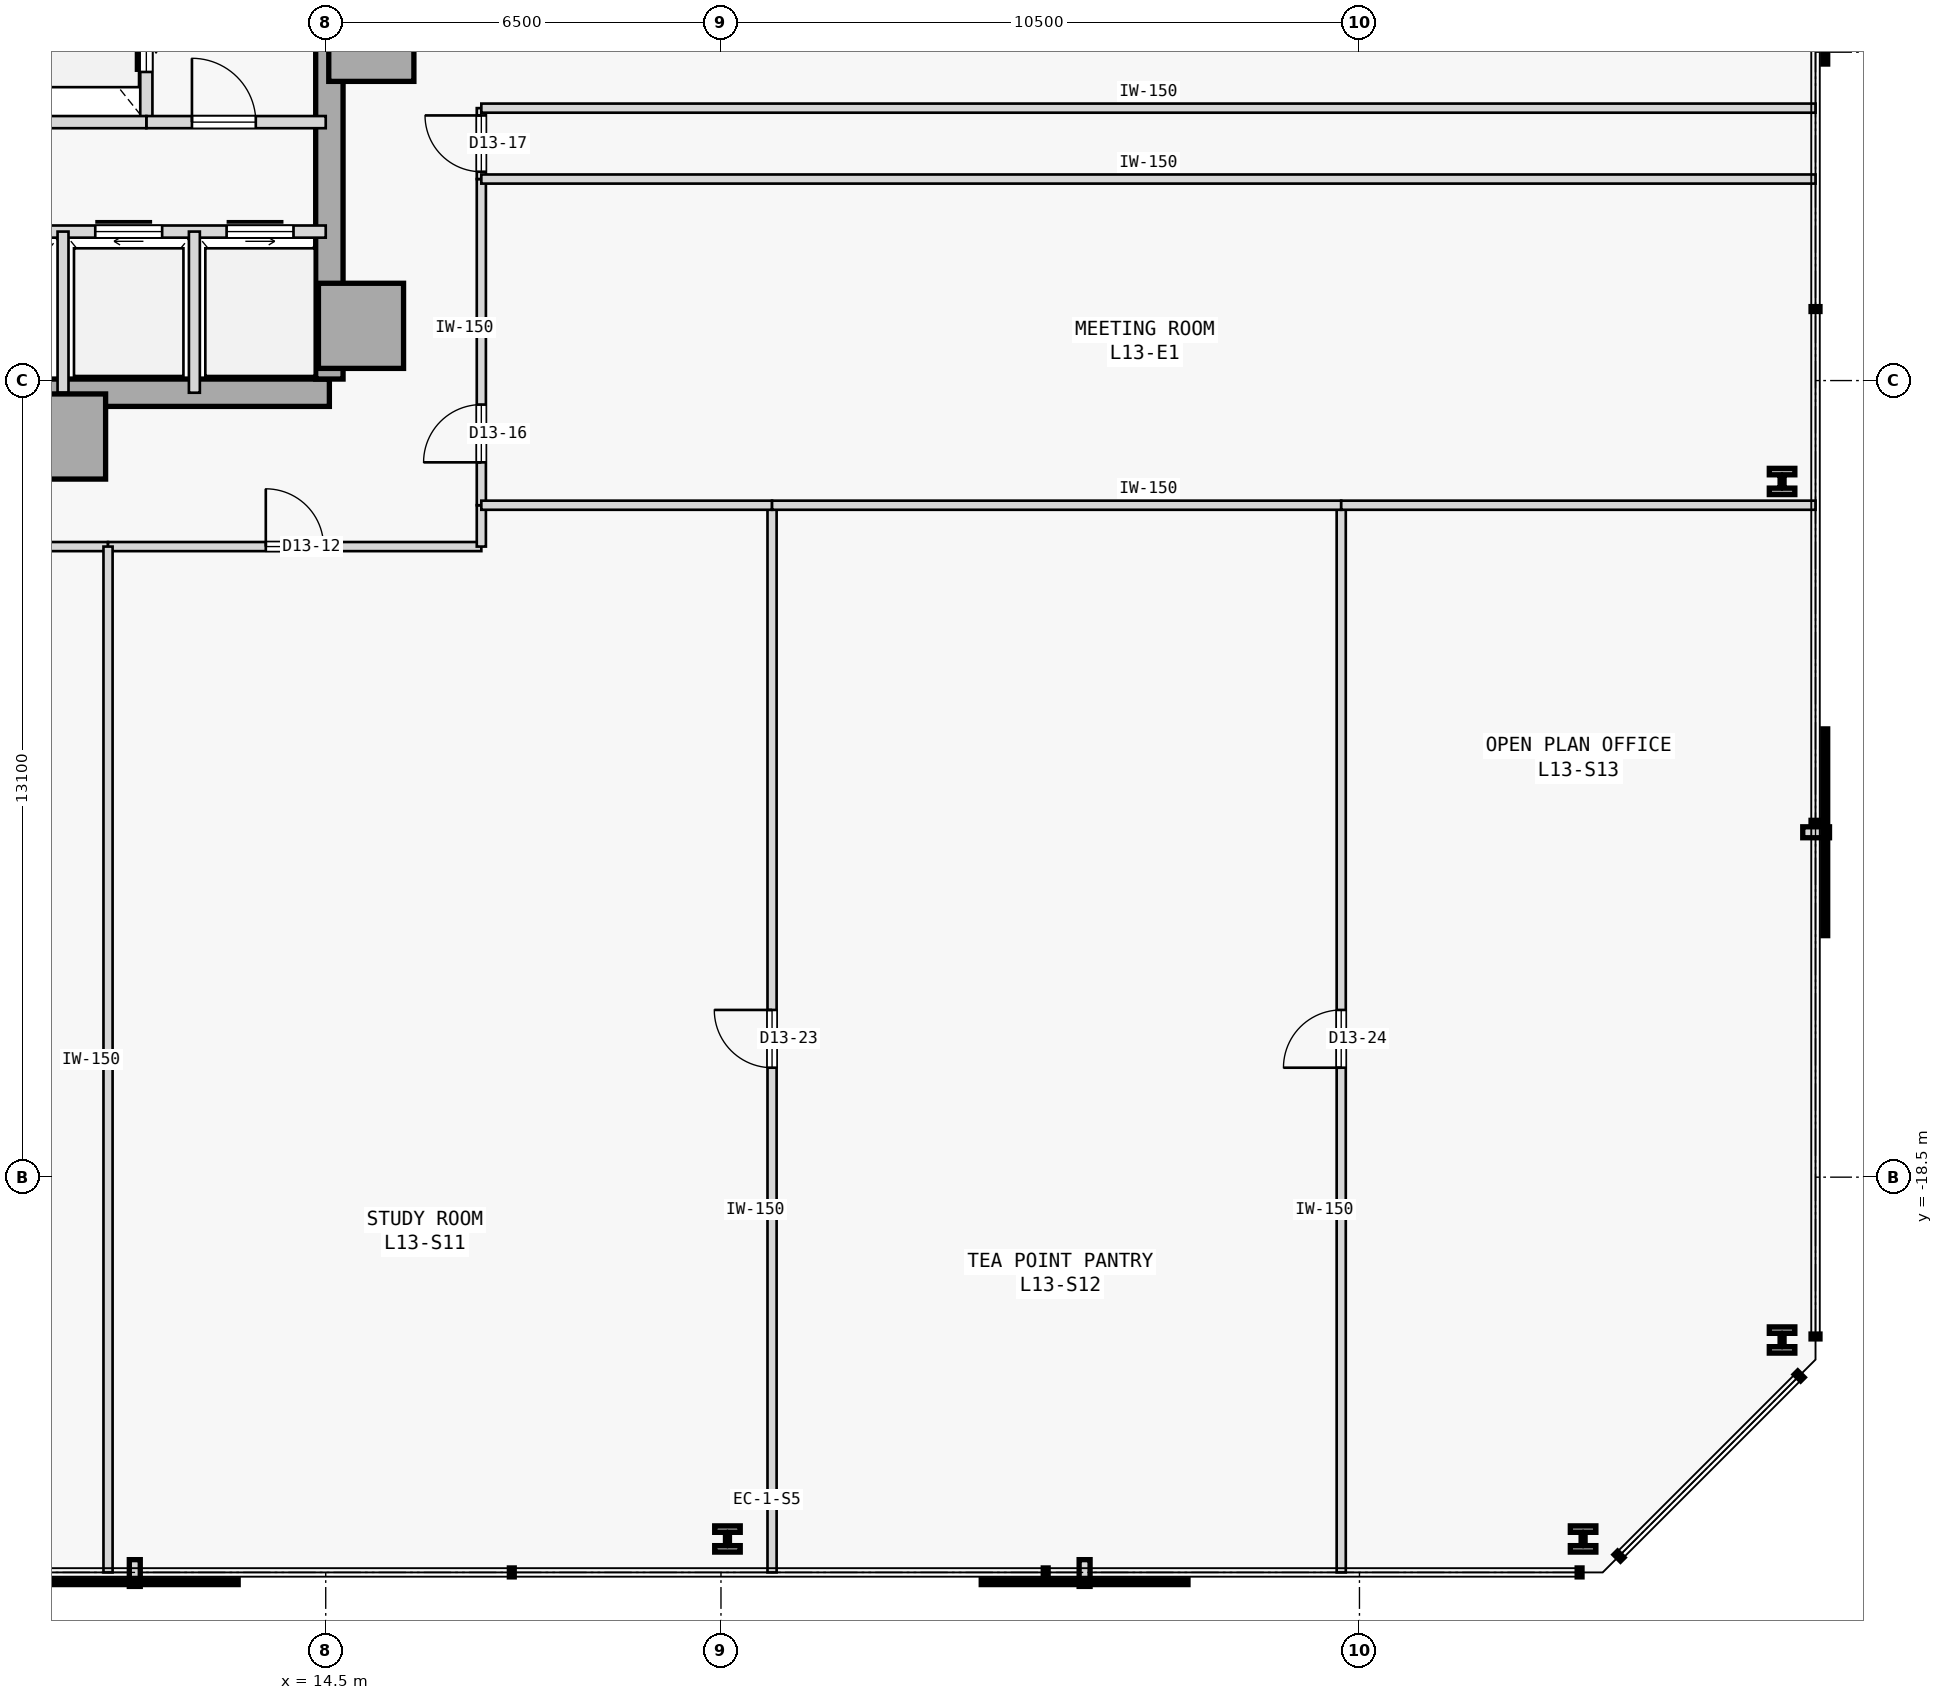
"""IFC4 building model, lengths in metres.
Left out: names, types, materials, properties, quantities, classifications, styles, units other than length and angle.
Written with IfcOpenShell. Run it as: python <this file> out.ifc"""

import sys

from ifc_helpers import new_model, si_unit, direction, frame, frame_2d, origin, origin_2d, place, context, subcontext, project, spatial, rectangle, i_section, extrude, element, fill, save


model = new_model("IFC4")
c1 = context("Model", 3, precision=1e-05, world=origin(), true_north=direction((0.0, 1.0)))
c2 = subcontext(c1, "Body", "Model", "MODEL_VIEW")
j1 = project(units=[si_unit("LENGTHUNIT", "METRE"), si_unit("PLANEANGLEUNIT", "RADIAN")], contexts=[c1])
p1 = place(None, origin())
s1 = spatial("IfcSite", under=j1, at=p1, CompositionType="ELEMENT")
p2 = place(p1, origin())
s2 = spatial("IfcBuilding", under=s1, at=p2, CompositionType="ELEMENT")
p3 = place(p2, frame((0.0, 0.0, 56.0)))
s3 = spatial("IfcBuildingStorey", under=s2, at=p3, CompositionType="ELEMENT", Elevation=56.0)
for number, where, z_axis, x_axis in (
    (1, (15.25, 0.22, 0.0), (0.0, 0.0, 1.0), (1.0, 0.0, 0.0)),
    (2, (15.08, -4.5, 0.0), (0.0, 0.0, 1.0), (1.0, 0.0, 0.0)),
    (3, (10.18, -6.32, 0.0), (0.0, 0.0, 1.0), (1.0, 0.0, 0.0)),
):
    element("IfcColumn", number, at=place(p3, frame(where, z_axis=z_axis, x_axis=x_axis)), inside=s3, PredefinedType="COLUMN", context=c2, shape_type="SweptSolid", body=[
        extrude(rectangle(XDim=1.4, YDim=1.4, at=origin_2d()), origin(), (0.0, 0.0, 1.0), 3.8),
    ])
p4 = place(p3, frame((3.7, -5.6, 0.0), z_axis=(0.0, 0.0, 1.0), x_axis=(1.0, 0.0, 0.0)))
e4 = element("IfcWall", 4, at=p4, inside=s3, PredefinedType="SHEAR", context=c2, shape_type="SweptSolid", body=[
    extrude(rectangle(XDim=10.86, YDim=0.45, at=frame_2d((5.43, 0.0))), origin(), (0.0, 0.0, 1.0), 3.575),
])
p5 = place(p3, frame((14.56, -5.375, 0.0), z_axis=(0.0, 0.0, 1.0), x_axis=(0.0, 1.0, 0.0)))
e5 = element("IfcWall", 5, at=p5, inside=s3, PredefinedType="SHEAR", context=c2, shape_type="SweptSolid", body=[
    extrude(rectangle(XDim=10.75, YDim=0.45, at=frame_2d((5.375, 0.0))), origin(), (0.0, 0.0, 1.0), 3.575),
])
for number, where, z_axis, x_axis in (
    (6, (21.107, -24.45, 0.0), (0.0, 0.0, 1.0), (1.0, 0.0, 0.0)),
    (7, (35.178, -24.45, 0.0), (0.0, 0.0, 1.0), (1.0, 0.0, 0.0)),
    (8, (38.45, -21.178, 0.0), (0.0, 0.0, 1.0), (1.0, 0.0, 0.0)),
    (9, (38.45, -7.059, 0.0), (0.0, 0.0, 1.0), (1.0, 0.0, 0.0)),
):
    element("IfcColumn", number, at=place(p3, frame(where, z_axis=z_axis, x_axis=x_axis)), inside=s3, PredefinedType="COLUMN", context=c2, shape_type="SweptSolid", body=[
        extrude(i_section(OverallWidth=0.42, OverallDepth=0.431, WebThickness=0.065, FlangeThickness=0.106, FilletRadius=0.015, at=origin_2d()), origin(), (0.0, 0.0, 1.0), 3.8),
    ])
p6 = place(p3, frame((11.55, -1.15, 0.0), z_axis=(0.0, 0.0, 1.0), x_axis=(0.0, 1.0, 0.0)))
e10 = element("IfcWall", 10, at=p6, inside=s3, PredefinedType="STANDARD", context=c2, shape_type="SweptSolid", body=[
    extrude(rectangle(XDim=2.75, YDim=0.2, at=frame_2d((1.375, 0.0))), origin(), (0.0, 0.0, 1.0), 3.575),
])
p7 = place(p6, frame((0.825, 0.0, 0.0)))
e11 = element("IfcOpeningElement", 11, at=p7, cuts=e10, PredefinedType="OPENING", context=c2, shape_type="SweptSolid", body=[
    extrude(rectangle(XDim=1.1, YDim=2.15, at=frame_2d((0.55, 1.075))), frame((0.0, 0.11, 0.0), z_axis=(0.0, -1.0, 0.0), x_axis=(1.0, 0.0, 0.0)), (0.0, 0.0, 1.0), 0.22),
])
p8 = place(p3, frame((11.55, -1.15, 0.0), z_axis=(0.0, 0.0, 1.0), x_axis=(1.0, 0.0, 0.0)))
e12 = element("IfcWall", 12, at=p8, inside=s3, PredefinedType="STANDARD", context=c2, shape_type="SweptSolid", body=[
    extrude(rectangle(XDim=2.95, YDim=0.2, at=frame_2d((1.475, 0.0))), origin(), (0.0, 0.0, 1.0), 3.575),
])
p9 = place(p8, frame((0.75, 0.0, 0.0)))
e13 = element("IfcOpeningElement", 13, at=p9, cuts=e12, PredefinedType="OPENING", context=c2, shape_type="SweptSolid", body=[
    extrude(rectangle(XDim=1.05, YDim=2.18, at=frame_2d((0.525, 1.09))), frame((0.0, 0.11, 0.0), z_axis=(0.0, -1.0, 0.0), x_axis=(1.0, 0.0, 0.0)), (0.0, 0.0, 1.0), 0.22),
])
p10 = place(p3, frame((9.35, -1.15, 0.0), z_axis=(0.0, 0.0, 1.0), x_axis=(1.0, 0.0, 0.0)))
e14 = element("IfcWall", 14, at=p10, inside=s3, PredefinedType="STANDARD", context=c2, shape_type="SweptSolid", body=[
    extrude(rectangle(XDim=2.2, YDim=0.2, at=frame_2d((1.1, 0.0))), origin(), (0.0, 0.0, 1.0), 3.575),
])
p11 = place(p3, frame((3.7, -2.95, 0.0), z_axis=(0.0, 0.0, 1.0), x_axis=(1.0, 0.0, 0.0)))
e15 = element("IfcWall", 15, at=p11, inside=s3, PredefinedType="STANDARD", context=c2, shape_type="SweptSolid", body=[
    extrude(rectangle(XDim=10.8, YDim=0.2, at=frame_2d((5.4, 0.0))), origin(), (0.0, 0.0, 1.0), 3.575),
])
p12 = place(p11, frame((7.01, 0.0, 0.0)))
e16 = element("IfcOpeningElement", 16, at=p12, cuts=e15, PredefinedType="OPENING", context=c2, shape_type="SweptSolid", body=[
    extrude(rectangle(XDim=1.1, YDim=2.15, at=frame_2d((0.55, 1.075))), frame((0.0, 0.11, 0.0), z_axis=(0.0, -1.0, 0.0), x_axis=(1.0, 0.0, 0.0)), (0.0, 0.0, 1.0), 0.22),
])
p13 = place(p11, frame((9.17, 0.0, 0.0)))
e17 = element("IfcOpeningElement", 17, at=p13, cuts=e15, PredefinedType="OPENING", context=c2, shape_type="SweptSolid", body=[
    extrude(rectangle(XDim=1.1, YDim=2.15, at=frame_2d((0.55, 1.075))), frame((0.0, 0.11, 0.0), z_axis=(0.0, -1.0, 0.0), x_axis=(1.0, 0.0, 0.0)), (0.0, 0.0, 1.0), 0.22),
])
for number, where, z_axis, x_axis in (
    (18, (12.34, -5.6, 0.0), (0.0, 0.0, 1.0), (0.0, 1.0, 0.0)),
    (19, (10.18, -5.6, 0.0), (0.0, 0.0, 1.0), (0.0, 1.0, 0.0)),
):
    element("IfcWall", number, at=place(p3, frame(where, z_axis=z_axis, x_axis=x_axis)), inside=s3, PredefinedType="STANDARD", context=c2, shape_type="SweptSolid", body=[
        extrude(rectangle(XDim=2.65, YDim=0.18, at=frame_2d((1.325, 0.0))), origin(), (0.0, 0.0, 1.0), 3.575),
    ])
p14 = place(p3, frame((0.92, -8.13, 0.0), z_axis=(0.0, 0.0, 1.0), x_axis=(1.0, 0.0, 0.0)))
e20 = element("IfcWall", 20, at=p14, inside=s3, PredefinedType="PARTITIONING", context=c2, shape_type="SweptSolid", body=[
    extrude(rectangle(XDim=10.0, YDim=0.15, at=frame_2d((5.0, 0.0))), origin(), (0.0, 0.0, 1.0), 3.575),
])
p15 = place(p3, frame((10.92, -8.13, 0.0), z_axis=(0.0, 0.0, 1.0), x_axis=(1.0, 0.0, 0.0)))
e21 = element("IfcWall", 21, at=p15, inside=s3, PredefinedType="PARTITIONING", context=c2, shape_type="SweptSolid", body=[
    extrude(rectangle(XDim=6.139, YDim=0.15, at=frame_2d((3.07, 0.0))), origin(), (0.0, 0.0, 1.0), 3.575),
])
p16 = place(p15, frame((2.594, 0.0, 0.0)))
e22 = element("IfcOpeningElement", 22, at=p16, cuts=e21, PredefinedType="OPENING", context=c2, shape_type="SweptSolid", body=[
    extrude(rectangle(XDim=0.95, YDim=2.15, at=frame_2d((0.475, 1.075))), frame((0.0, 0.085, 0.0), z_axis=(0.0, -1.0, 0.0), x_axis=(1.0, 0.0, 0.0)), (0.0, 0.0, 1.0), 0.17),
])
p17 = place(p3, frame((17.059, -8.13, 0.0), z_axis=(0.0, 0.0, 1.0), x_axis=(0.0, 1.0, 0.0)))
e23 = element("IfcWall", 23, at=p17, inside=s3, PredefinedType="PARTITIONING", context=c2, shape_type="SweptSolid", body=[
    extrude(rectangle(XDim=0.68, YDim=0.15, at=frame_2d((0.34, 0.0))), origin(), (0.0, 0.0, 1.0), 3.575),
])
p18 = place(p3, frame((17.059, -7.45, 0.0), z_axis=(0.0, 0.0, 1.0), x_axis=(0.0, 1.0, 0.0)))
e24 = element("IfcWall", 24, at=p18, inside=s3, PredefinedType="PARTITIONING", context=c2, shape_type="SweptSolid", body=[
    extrude(rectangle(XDim=5.364, YDim=0.15, at=frame_2d((2.682, 0.0))), origin(), (0.0, 0.0, 1.0), 3.575),
])
p19 = place(p18, frame((0.705, 0.0, 0.0)))
e25 = element("IfcOpeningElement", 25, at=p19, cuts=e24, PredefinedType="OPENING", context=c2, shape_type="SweptSolid", body=[
    extrude(rectangle(XDim=0.95, YDim=2.15, at=frame_2d((0.475, 1.075))), frame((0.0, 0.085, 0.0), z_axis=(0.0, -1.0, 0.0), x_axis=(1.0, 0.0, 0.0)), (0.0, 0.0, 1.0), 0.17),
])
p20 = place(p3, frame((17.059, -2.086, 0.0), z_axis=(0.0, 0.0, 1.0), x_axis=(0.0, 1.0, 0.0)))
e26 = element("IfcWall", 26, at=p20, inside=s3, PredefinedType="PARTITIONING", context=c2, shape_type="SweptSolid", body=[
    extrude(rectangle(XDim=1.166, YDim=0.15, at=frame_2d((0.583, 0.0))), origin(), (0.0, 0.0, 1.0), 3.575),
])
p21 = place(p20, frame((0.12, 0.0, 0.0)))
e27 = element("IfcOpeningElement", 27, at=p21, cuts=e26, PredefinedType="OPENING", context=c2, shape_type="SweptSolid", body=[
    extrude(rectangle(XDim=0.926, YDim=2.15, at=frame_2d((0.463, 1.075))), frame((0.0, 0.085, 0.0), z_axis=(0.0, -1.0, 0.0), x_axis=(1.0, 0.0, 0.0)), (0.0, 0.0, 1.0), 0.17),
])
p22 = place(p3, frame((17.059, -0.92, 0.0), z_axis=(0.0, 0.0, 1.0), x_axis=(1.0, 0.0, 0.0)))
e28 = element("IfcWall", 28, at=p22, inside=s3, PredefinedType="PARTITIONING", context=c2, shape_type="SweptSolid", body=[
    extrude(rectangle(XDim=21.941, YDim=0.15, at=frame_2d((10.97, 0.0))), origin(), (0.0, 0.0, 1.0), 3.575),
])
p23 = place(p3, frame((10.92, -25.0, 0.0), z_axis=(0.0, 0.0, 1.0), x_axis=(0.0, 1.0, 0.0)))
e29 = element("IfcWall", 29, at=p23, inside=s3, PredefinedType="PARTITIONING", context=c2, shape_type="SweptSolid", body=[
    extrude(rectangle(XDim=16.87, YDim=0.15, at=frame_2d((8.435, 0.0))), origin(), (0.0, 0.0, 1.0), 3.575),
])
p24 = place(p3, frame((21.84, -25.0, 0.0), z_axis=(0.0, 0.0, 1.0), x_axis=(0.0, 1.0, 0.0)))
e30 = element("IfcWall", 30, at=p24, inside=s3, PredefinedType="PARTITIONING", context=c2, shape_type="SweptSolid", body=[
    extrude(rectangle(XDim=17.55, YDim=0.15, at=frame_2d((8.775, 0.0))), origin(), (0.0, 0.0, 1.0), 3.575),
])
p25 = place(p24, frame((8.3, 0.0, 0.0)))
e31 = element("IfcOpeningElement", 31, at=p25, cuts=e30, PredefinedType="OPENING", context=c2, shape_type="SweptSolid", body=[
    extrude(rectangle(XDim=0.95, YDim=2.15, at=frame_2d((0.475, 1.075))), frame((0.0, 0.085, 0.0), z_axis=(0.0, -1.0, 0.0), x_axis=(1.0, 0.0, 0.0)), (0.0, 0.0, 1.0), 0.17),
])
p26 = place(p3, frame((17.059, -7.45, 0.0), z_axis=(0.0, 0.0, 1.0), x_axis=(1.0, 0.0, 0.0)))
e32 = element("IfcWall", 32, at=p26, inside=s3, PredefinedType="PARTITIONING", context=c2, shape_type="SweptSolid", body=[
    extrude(rectangle(XDim=4.781, YDim=0.15, at=frame_2d((2.391, 0.0))), origin(), (0.0, 0.0, 1.0), 3.575),
])
p27 = place(p3, frame((31.2, -25.0, 0.0), z_axis=(0.0, 0.0, 1.0), x_axis=(0.0, 1.0, 0.0)))
e33 = element("IfcWall", 33, at=p27, inside=s3, PredefinedType="PARTITIONING", context=c2, shape_type="SweptSolid", body=[
    extrude(rectangle(XDim=17.55, YDim=0.15, at=frame_2d((8.775, 0.0))), origin(), (0.0, 0.0, 1.0), 3.575),
])
p28 = place(p27, frame((8.3, 0.0, 0.0)))
e34 = element("IfcOpeningElement", 34, at=p28, cuts=e33, PredefinedType="OPENING", context=c2, shape_type="SweptSolid", body=[
    extrude(rectangle(XDim=0.95, YDim=2.15, at=frame_2d((0.475, 1.075))), frame((0.0, 0.085, 0.0), z_axis=(0.0, -1.0, 0.0), x_axis=(1.0, 0.0, 0.0)), (0.0, 0.0, 1.0), 0.17),
])
p29 = place(p3, frame((21.84, -7.45, 0.0), z_axis=(0.0, 0.0, 1.0), x_axis=(1.0, 0.0, 0.0)))
e35 = element("IfcWall", 35, at=p29, inside=s3, PredefinedType="PARTITIONING", context=c2, shape_type="SweptSolid", body=[
    extrude(rectangle(XDim=9.36, YDim=0.15, at=frame_2d((4.68, 0.0))), origin(), (0.0, 0.0, 1.0), 3.575),
])
p30 = place(p3, frame((31.2, -7.45, 0.0), z_axis=(0.0, 0.0, 1.0), x_axis=(1.0, 0.0, 0.0)))
e36 = element("IfcWall", 36, at=p30, inside=s3, PredefinedType="PARTITIONING", context=c2, shape_type="SweptSolid", body=[
    extrude(rectangle(XDim=7.8, YDim=0.15, at=frame_2d((3.9, 0.0))), origin(), (0.0, 0.0, 1.0), 3.575),
])
p31 = place(p3, frame((17.059, -2.086, 0.0), z_axis=(0.0, 0.0, 1.0), x_axis=(1.0, 0.0, 0.0)))
e37 = element("IfcWall", 37, at=p31, inside=s3, PredefinedType="PARTITIONING", context=c2, shape_type="SweptSolid", body=[
    extrude(rectangle(XDim=21.941, YDim=0.15, at=frame_2d((10.97, 0.0))), origin(), (0.0, 0.0, 1.0), 3.575),
])
p32 = place(p9, origin())
e38 = element("IfcDoor", 38, at=p32, inside=s3, OperationType="SINGLE_SWING_LEFT", PredefinedType="DOOR", context=c2, shape_type="SweptSolid", body=[
    extrude(rectangle(XDim=1.05, YDim=2.18, at=frame_2d((0.525, 1.09))), frame((0.0, 0.025, 0.0), z_axis=(0.0, -1.0, 0.0), x_axis=(1.0, 0.0, 0.0)), (0.0, 0.0, 1.0), 0.05),
])
fill(e13, e38)
p33 = place(p7, origin())
e39 = element("IfcDoor", 39, at=p33, inside=s3, OperationType="SLIDING_TO_RIGHT", PredefinedType="DOOR", context=c2, shape_type="SweptSolid", body=[
    extrude(rectangle(XDim=1.1, YDim=2.15, at=frame_2d((0.55, 1.075))), frame((0.0, 0.025, 0.0), z_axis=(0.0, -1.0, 0.0), x_axis=(1.0, 0.0, 0.0)), (0.0, 0.0, 1.0), 0.05),
])
fill(e11, e39)
p34 = place(p12, origin())
e40 = element("IfcDoor", 40, at=p34, inside=s3, OperationType="SLIDING_TO_RIGHT", PredefinedType="DOOR", context=c2, shape_type="SweptSolid", body=[
    extrude(rectangle(XDim=1.1, YDim=2.15, at=frame_2d((0.55, 1.075))), frame((0.0, 0.025, 0.0), z_axis=(0.0, -1.0, 0.0), x_axis=(1.0, 0.0, 0.0)), (0.0, 0.0, 1.0), 0.05),
])
fill(e16, e40)
p35 = place(p13, origin())
e41 = element("IfcDoor", 41, at=p35, inside=s3, OperationType="SLIDING_TO_LEFT", PredefinedType="DOOR", context=c2, shape_type="SweptSolid", body=[
    extrude(rectangle(XDim=1.1, YDim=2.15, at=frame_2d((0.55, 1.075))), frame((0.0, 0.025, 0.0), z_axis=(0.0, -1.0, 0.0), x_axis=(1.0, 0.0, 0.0)), (0.0, 0.0, 1.0), 0.05),
])
fill(e17, e41)
p36 = place(p16, origin())
e42 = element("IfcDoor", 42, at=p36, inside=s3, OperationType="SINGLE_SWING_LEFT", PredefinedType="DOOR", context=c2, shape_type="SweptSolid", body=[
    extrude(rectangle(XDim=0.95, YDim=2.15, at=frame_2d((0.475, 1.075))), frame((0.0, 0.025, 0.0), z_axis=(0.0, -1.0, 0.0), x_axis=(1.0, 0.0, 0.0)), (0.0, 0.0, 1.0), 0.05),
])
fill(e22, e42)
p37 = place(p19, origin())
e43 = element("IfcDoor", 43, at=p37, inside=s3, OperationType="SINGLE_SWING_LEFT", PredefinedType="DOOR", context=c2, shape_type="SweptSolid", body=[
    extrude(rectangle(XDim=0.95, YDim=2.15, at=frame_2d((0.475, 1.075))), frame((0.0, 0.025, 0.0), z_axis=(0.0, -1.0, 0.0), x_axis=(1.0, 0.0, 0.0)), (0.0, 0.0, 1.0), 0.05),
])
fill(e25, e43)
p38 = place(p21, origin())
e44 = element("IfcDoor", 44, at=p38, inside=s3, OperationType="SINGLE_SWING_RIGHT", PredefinedType="DOOR", context=c2, shape_type="SweptSolid", body=[
    extrude(rectangle(XDim=0.926, YDim=2.15, at=frame_2d((0.463, 1.075))), frame((0.0, 0.025, 0.0), z_axis=(0.0, -1.0, 0.0), x_axis=(1.0, 0.0, 0.0)), (0.0, 0.0, 1.0), 0.05),
])
fill(e27, e44)
p39 = place(p25, origin())
e45 = element("IfcDoor", 45, at=p39, inside=s3, OperationType="SINGLE_SWING_RIGHT", PredefinedType="DOOR", context=c2, shape_type="SweptSolid", body=[
    extrude(rectangle(XDim=0.95, YDim=2.15, at=frame_2d((0.475, 1.075))), frame((0.0, 0.025, 0.0), z_axis=(0.0, -1.0, 0.0), x_axis=(1.0, 0.0, 0.0)), (0.0, 0.0, 1.0), 0.05),
])
fill(e31, e45)
p40 = place(p28, origin())
e46 = element("IfcDoor", 46, at=p40, inside=s3, OperationType="SINGLE_SWING_LEFT", PredefinedType="DOOR", context=c2, shape_type="SweptSolid", body=[
    extrude(rectangle(XDim=0.95, YDim=2.15, at=frame_2d((0.475, 1.075))), frame((0.0, 0.025, 0.0), z_axis=(0.0, -1.0, 0.0), x_axis=(1.0, 0.0, 0.0)), (0.0, 0.0, 1.0), 0.05),
])
fill(e34, e46)
save(model, sys.argv[1])
